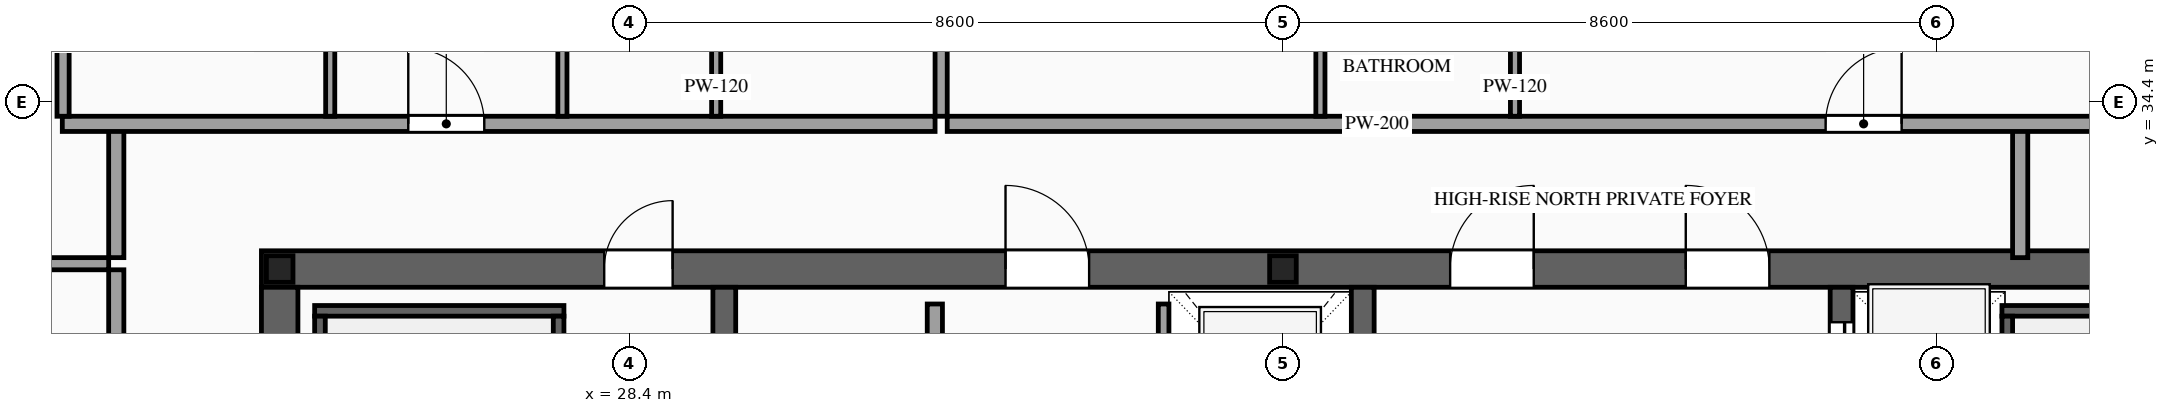
"""IFC4 building model, lengths in metres.
Left out: names, types, materials, properties, quantities, classifications, styles, units other than length and angle.
Written with IfcOpenShell. Run it as: python <this file> out.ifc"""

import sys

from ifc_helpers import new_model, si_unit, direction, frame, frame_2d, origin, origin_2d, place, context, subcontext, project, spatial, rectangle, i_section, extrude, source, transform, mapped, element, fill, save


model = new_model("IFC4")
c1 = context("Model", 3, precision=1e-05, world=origin(), true_north=direction((0.0, 1.0)))
c2 = subcontext(c1, "Body", "Model", "MODEL_VIEW")
j1 = project(units=[si_unit("LENGTHUNIT", "METRE"), si_unit("PLANEANGLEUNIT", "RADIAN")], contexts=[c1])
p1 = place(None, origin())
s1 = spatial("IfcSite", under=j1, at=p1, CompositionType="ELEMENT")
p2 = place(p1, origin())
s2 = spatial("IfcBuilding", under=s1, at=p2, CompositionType="ELEMENT")
p3 = place(p2, frame((0.0, 0.0, 343.2)))
s3 = spatial("IfcBuildingStorey", under=s2, at=p3, CompositionType="ELEMENT", Elevation=343.2)
p4 = place(p3, frame((23.56, 32.2, 0.0), z_axis=(0.0, 0.0, 1.0), x_axis=(1.0, 0.0, 0.0)))
e1 = element("IfcWall", 1, at=p4, inside=s3, PredefinedType="SHEAR", context=c2, shape_type="SweptSolid", body=[
    extrude(rectangle(XDim=26.88, YDim=0.48, at=frame_2d((13.44, 0.0))), origin(), (0.0, 0.0, 1.0), 4.0),
])
p5 = place(p4, frame((4.51, 0.0, 0.0)))
e2 = element("IfcOpeningElement", 2, at=p5, cuts=e1, PredefinedType="OPENING", context=c2, shape_type="SweptSolid", body=[
    extrude(rectangle(XDim=0.9, YDim=2.15, at=frame_2d((0.45, 1.075))), frame((0.0, 0.255, 0.0), z_axis=(0.0, -1.0, 0.0), x_axis=(1.0, 0.0, 0.0)), (0.0, 0.0, 1.0), 0.51),
])
p6 = place(p4, frame((9.79, 0.0, 0.0)))
e3 = element("IfcOpeningElement", 3, at=p6, cuts=e1, PredefinedType="OPENING", context=c2, shape_type="SweptSolid", body=[
    extrude(rectangle(XDim=1.1, YDim=2.2, at=frame_2d((0.55, 1.1))), frame((0.0, 0.255, 0.0), z_axis=(0.0, -1.0, 0.0), x_axis=(1.0, 0.0, 0.0)), (0.0, 0.0, 1.0), 0.51),
])
p7 = place(p4, frame((15.64, 0.0, 0.0)))
e4 = element("IfcOpeningElement", 4, at=p7, cuts=e1, PredefinedType="OPENING", context=c2, shape_type="SweptSolid", body=[
    extrude(rectangle(XDim=1.1, YDim=2.2, at=frame_2d((0.55, 1.1))), frame((0.0, 0.255, 0.0), z_axis=(0.0, -1.0, 0.0), x_axis=(1.0, 0.0, 0.0)), (0.0, 0.0, 1.0), 0.51),
])
p8 = place(p4, frame((18.74, 0.0, 0.0)))
e5 = element("IfcOpeningElement", 5, at=p8, cuts=e1, PredefinedType="OPENING", context=c2, shape_type="SweptSolid", body=[
    extrude(rectangle(XDim=1.1, YDim=2.2, at=frame_2d((0.55, 1.1))), frame((0.0, 0.255, 0.0), z_axis=(0.0, -1.0, 0.0), x_axis=(1.0, 0.0, 0.0)), (0.0, 0.0, 1.0), 0.51),
])
m1 = source(origin(), c2, "Body", "SweptSolid", [
    extrude(rectangle(XDim=12.32, YDim=0.48, at=frame_2d((6.16, 0.0))), origin(), (0.0, 0.0, 1.0), 4.0),
])
p9 = place(p3, frame((23.8, 19.64, 0.0), z_axis=(0.0, 0.0, 1.0), x_axis=(0.0, 1.0, 0.0)))
e6 = element("IfcWall", 6, at=p9, inside=s3, PredefinedType="SHEAR", context=c2, shape_type="MappedRepresentation", body=[
    mapped(m1, transform((0.0, 0.0, 0.0), scale=1.0)),
])
m2 = source(origin(), c2, "Body", "SweptSolid", [
    extrude(rectangle(XDim=12.32, YDim=0.3, at=frame_2d((6.16, 0.0))), origin(), (0.0, 0.0, 1.0), 4.0),
])
for number, where, z_axis, x_axis in (
    (7, (29.65, 19.64, 0.0), (0.0, 0.0, 1.0), (0.0, 1.0, 0.0)),
    (8, (38.05, 19.64, 0.0), (0.0, 0.0, 1.0), (0.0, 1.0, 0.0)),
):
    element("IfcWall", number, at=place(p3, frame(where, z_axis=z_axis, x_axis=x_axis)), inside=s3, PredefinedType="SOLIDWALL", context=c2, shape_type="MappedRepresentation", body=[
        mapped(m2, transform((0.0, 0.0, 0.0), scale=1.0)),
    ])
p10 = place(p3, frame((44.35, 19.64, 0.0), z_axis=(0.0, 0.0, 1.0), x_axis=(0.0, 1.0, 0.0)))
e9 = element("IfcWall", 9, at=p10, inside=s3, PredefinedType="SOLIDWALL", context=c2, shape_type="SweptSolid", body=[
    extrude(rectangle(XDim=12.32, YDim=0.3, at=frame_2d((6.16, 0.0))), origin(), (0.0, 0.0, 1.0), 4.0),
])
p11 = place(p10, frame((6.56, 0.0, 0.0)))
e10 = element("IfcOpeningElement", 10, at=p11, cuts=e9, PredefinedType="OPENING", context=c2, shape_type="SweptSolid", body=[
    extrude(rectangle(XDim=1.1, YDim=2.2, at=frame_2d((0.55, 1.1))), frame((0.0, 0.165, 0.0), z_axis=(0.0, -1.0, 0.0), x_axis=(1.0, 0.0, 0.0)), (0.0, 0.0, 1.0), 0.33),
])
p12 = place(p10, frame((8.66, 0.0, 0.0)))
e11 = element("IfcOpeningElement", 11, at=p12, cuts=e9, PredefinedType="OPENING", context=c2, shape_type="SweptSolid", body=[
    extrude(rectangle(XDim=1.1, YDim=2.2, at=frame_2d((0.55, 1.1))), frame((0.0, 0.165, 0.0), z_axis=(0.0, -1.0, 0.0), x_axis=(1.0, 0.0, 0.0)), (0.0, 0.0, 1.0), 0.33),
])
p13 = place(p10, frame((10.76, 0.0, 0.0)))
e12 = element("IfcOpeningElement", 12, at=p13, cuts=e9, PredefinedType="OPENING", context=c2, shape_type="SweptSolid", body=[
    extrude(rectangle(XDim=1.1, YDim=2.2, at=frame_2d((0.55, 1.1))), frame((0.0, 0.165, 0.0), z_axis=(0.0, -1.0, 0.0), x_axis=(1.0, 0.0, 0.0)), (0.0, 0.0, 1.0), 0.33),
])
m3 = source(origin(), c2, "Body", "SweptSolid", [
    extrude(i_section(OverallWidth=0.35, OverallDepth=0.35, WebThickness=0.012, FlangeThickness=0.019, at=origin_2d()), origin(), (0.0, 0.0, 1.0), 4.0),
])
for number, where, z_axis, x_axis in (
    (13, (23.8, 32.2, 0.0), (0.0, 0.0, 1.0), (1.0, 0.0, 0.0)),
    (14, (37.0, 32.2, 0.0), (0.0, 0.0, 1.0), (1.0, 0.0, 0.0)),
):
    element("IfcColumn", number, at=place(p3, frame(where, z_axis=z_axis, x_axis=x_axis)), inside=s3, PredefinedType="COLUMN", context=c2, shape_type="MappedRepresentation", body=[
        mapped(m3, transform((0.0, 0.0, 0.0), scale=1.0)),
    ])
p14 = place(p3, frame((35.43, 29.4, 0.0), z_axis=(0.0, 0.0, 1.0), x_axis=(0.0, 1.0, 0.0)))
e15 = element("IfcWall", 15, at=p14, inside=s3, PredefinedType="SOLIDWALL", context=c2, shape_type="SweptSolid", body=[
    extrude(rectangle(XDim=2.34, YDim=0.14, at=frame_2d((1.17, 0.0))), origin(), (0.0, 0.0, 1.0), 3.76),
])
p15 = place(p14, frame((0.62, 0.0, 0.0)))
e16 = element("IfcOpeningElement", 16, at=p15, cuts=e15, PredefinedType="OPENING", context=c2, shape_type="SweptSolid", body=[
    extrude(rectangle(XDim=1.1, YDim=2.2, at=frame_2d((0.55, 1.1))), frame((0.0, 0.085, 0.0), z_axis=(0.0, -1.0, 0.0), x_axis=(1.0, 0.0, 0.0)), (0.0, 0.0, 1.0), 0.17),
])
m4 = source(origin(), c2, "Body", "SweptSolid", [
    extrude(rectangle(XDim=3.28, YDim=0.14, at=frame_2d((1.64, 0.0))), origin(), (0.0, 0.0, 1.0), 3.76),
])
p16 = place(p3, frame((24.26, 31.65, 0.0), z_axis=(0.0, 0.0, 1.0), x_axis=(1.0, 0.0, 0.0)))
e17 = element("IfcWall", 17, at=p16, inside=s3, PredefinedType="SOLIDWALL", context=c2, shape_type="MappedRepresentation", body=[
    mapped(m4, transform((0.0, 0.0, 0.0), scale=1.0)),
])
m5 = source(origin(), c2, "Body", "SweptSolid", [
    extrude(rectangle(XDim=8.94, YDim=0.14, at=frame_2d((4.47, 0.0))), origin(), (0.0, 0.0, 1.0), 3.76),
])
for number, where, z_axis, x_axis in (
    (18, (24.33, 22.64, 0.0), (0.0, 0.0, 1.0), (0.0, 1.0, 0.0)),
    (19, (27.47, 22.64, 0.0), (0.0, 0.0, 1.0), (0.0, 1.0, 0.0)),
):
    element("IfcWall", number, at=place(p3, frame(where, z_axis=z_axis, x_axis=x_axis)), inside=s3, PredefinedType="SOLIDWALL", context=c2, shape_type="MappedRepresentation", body=[
        mapped(m5, transform((0.0, 0.0, 0.0), scale=1.0)),
    ])
p17 = place(p3, frame((46.46, 31.65, 0.0), z_axis=(0.0, 0.0, 1.0), x_axis=(1.0, 0.0, 0.0)))
e20 = element("IfcWall", 20, at=p17, inside=s3, PredefinedType="SOLIDWALL", context=c2, shape_type="MappedRepresentation", body=[
    mapped(m4, transform((0.0, 0.0, 0.0), scale=1.0)),
])
p18 = place(p3, frame((46.53, 22.64, 0.0), z_axis=(0.0, 0.0, 1.0), x_axis=(0.0, 1.0, 0.0)))
e21 = element("IfcWall", 21, at=p18, inside=s3, PredefinedType="SOLIDWALL", context=c2, shape_type="MappedRepresentation", body=[
    mapped(m5, transform((0.0, 0.0, 0.0), scale=1.0)),
])
p19 = place(p3, frame((32.42, 28.05, 0.0), z_axis=(0.0, 0.0, 1.0), x_axis=(0.0, 1.0, 0.0)))
e22 = element("IfcWall", 22, at=p19, inside=s3, PredefinedType="PARTITIONING", context=c2, shape_type="SweptSolid", body=[
    extrude(rectangle(XDim=3.69, YDim=0.2, at=frame_2d((1.845, 0.0))), origin(), (0.0, 0.0, 1.0), 3.76),
])
p20 = place(p19, frame((1.395, 0.0, 0.0)))
e23 = element("IfcOpeningElement", 23, at=p20, cuts=e22, PredefinedType="OPENING", context=c2, shape_type="SweptSolid", body=[
    extrude(rectangle(XDim=0.9, YDim=2.15, at=frame_2d((0.45, 1.075))), frame((0.0, 0.115, 0.0), z_axis=(0.0, -1.0, 0.0), x_axis=(1.0, 0.0, 0.0)), (0.0, 0.0, 1.0), 0.23),
])
m6 = source(origin(), c2, "Body", "SweptSolid", [
    extrude(rectangle(XDim=1.7, YDim=0.2, at=frame_2d((0.85, 0.0))), origin(), (0.0, 0.0, 1.0), 3.76),
])
for number, where, z_axis, x_axis in (
    (24, (21.65, 32.35, 0.0), (0.0, 0.0, 1.0), (0.0, 1.0, 0.0)),
    (25, (46.7, 32.35, 0.0), (0.0, 0.0, 1.0), (0.0, 1.0, 0.0)),
):
    element("IfcWall", number, at=place(p3, frame(where, z_axis=z_axis, x_axis=x_axis)), inside=s3, PredefinedType="PARTITIONING", context=c2, shape_type="MappedRepresentation", body=[
        mapped(m6, transform((0.0, 0.0, 0.0), scale=1.0)),
    ])
p21 = place(p3, frame((20.94, 34.11, 0.0), z_axis=(0.0, 0.0, 1.0), x_axis=(1.0, 0.0, 0.0)))
e26 = element("IfcWall", 26, at=p21, inside=s3, PredefinedType="PARTITIONING", context=c2, shape_type="SweptSolid", body=[
    extrude(rectangle(XDim=11.483, YDim=0.2, at=frame_2d((5.742, 0.0))), origin(), (0.0, 0.0, 1.0), 3.76),
])
p22 = place(p21, frame((4.552, 0.0, 0.0)))
e27 = element("IfcOpeningElement", 27, at=p22, cuts=e26, PredefinedType="OPENING", context=c2, shape_type="SweptSolid", body=[
    extrude(rectangle(XDim=1.0, YDim=2.2, at=frame_2d((0.5, 1.1))), frame((0.0, 0.115, 0.0), z_axis=(0.0, -1.0, 0.0), x_axis=(1.0, 0.0, 0.0)), (0.0, 0.0, 1.0), 0.23),
])
m7 = source(origin(), c2, "Body", "SweptSolid", [
    extrude(rectangle(XDim=10.54, YDim=0.16, at=frame_2d((5.27, 0.0))), origin(), (0.0, 0.0, 1.0), 3.76),
])
p23 = place(p3, frame((32.503, 34.21, 0.0), z_axis=(0.0, 0.0, 1.0), x_axis=(0.0, 1.0, 0.0)))
e28 = element("IfcWall", 28, at=p23, inside=s3, PredefinedType="PARTITIONING", context=c2, shape_type="MappedRepresentation", body=[
    mapped(m7, transform((0.0, 0.0, 0.0), scale=1.0)),
])
m8 = source(origin(), c2, "Body", "SweptSolid", [
    extrude(rectangle(XDim=2.9, YDim=0.12, at=frame_2d((1.45, 0.0))), origin(), (0.0, 0.0, 1.0), 3.76),
])
p24 = place(p3, frame((24.465, 34.21, 0.0), z_axis=(0.0, 0.0, 1.0), x_axis=(0.0, 1.0, 0.0)))
e29 = element("IfcWall", 29, at=p24, inside=s3, PredefinedType="PARTITIONING", context=c2, shape_type="MappedRepresentation", body=[
    mapped(m8, transform((0.0, 0.0, 0.0), scale=1.0)),
])
p25 = place(p3, frame((29.543, 34.21, 0.0), z_axis=(0.0, 0.0, 1.0), x_axis=(0.0, 1.0, 0.0)))
e30 = element("IfcWall", 30, at=p25, inside=s3, PredefinedType="PARTITIONING", context=c2, shape_type="SweptSolid", body=[
    extrude(rectangle(XDim=2.9, YDim=0.12, at=frame_2d((1.45, 0.0))), origin(), (0.0, 0.0, 1.0), 3.76),
])
p26 = place(p25, frame((1.025, 0.0, 0.0)))
e31 = element("IfcOpeningElement", 31, at=p26, cuts=e30, PredefinedType="OPENING", context=c2, shape_type="SweptSolid", body=[
    extrude(rectangle(XDim=0.85, YDim=2.1, at=frame_2d((0.425, 1.05))), frame((0.0, 0.075, 0.0), z_axis=(0.0, -1.0, 0.0), x_axis=(1.0, 0.0, 0.0)), (0.0, 0.0, 1.0), 0.15),
])
p27 = place(p3, frame((27.52, 34.21, 0.0), z_axis=(0.0, 0.0, 1.0), x_axis=(0.0, 1.0, 0.0)))
e32 = element("IfcWall", 32, at=p27, inside=s3, PredefinedType="PARTITIONING", context=c2, shape_type="SweptSolid", body=[
    extrude(rectangle(XDim=2.9, YDim=0.12, at=frame_2d((1.45, 0.0))), origin(), (0.0, 0.0, 1.0), 3.76),
])
p28 = place(p27, frame((1.025, 0.0, 0.0)))
e33 = element("IfcOpeningElement", 33, at=p28, cuts=e32, PredefinedType="OPENING", context=c2, shape_type="SweptSolid", body=[
    extrude(rectangle(XDim=0.85, YDim=2.1, at=frame_2d((0.425, 1.05))), frame((0.0, 0.075, 0.0), z_axis=(0.0, -1.0, 0.0), x_axis=(1.0, 0.0, 0.0)), (0.0, 0.0, 1.0), 0.15),
])
p29 = place(p3, frame((32.583, 34.11, 0.0), z_axis=(0.0, 0.0, 1.0), x_axis=(1.0, 0.0, 0.0)))
e34 = element("IfcWall", 34, at=p29, inside=s3, PredefinedType="PARTITIONING", context=c2, shape_type="SweptSolid", body=[
    extrude(rectangle(XDim=20.477, YDim=0.2, at=frame_2d((10.239, 0.0))), origin(), (0.0, 0.0, 1.0), 3.76),
])
p30 = place(p29, frame((11.557, 0.0, 0.0)))
e35 = element("IfcOpeningElement", 35, at=p30, cuts=e34, PredefinedType="OPENING", context=c2, shape_type="SweptSolid", body=[
    extrude(rectangle(XDim=1.0, YDim=2.2, at=frame_2d((0.5, 1.1))), frame((0.0, 0.115, 0.0), z_axis=(0.0, -1.0, 0.0), x_axis=(1.0, 0.0, 0.0)), (0.0, 0.0, 1.0), 0.23),
])
m9 = source(origin(), c2, "Body", "SweptSolid", [
    extrude(rectangle(XDim=10.39, YDim=0.16, at=frame_2d((5.195, 0.0))), origin(), (0.0, 0.0, 1.0), 3.76),
])
p31 = place(p3, frame((20.95, 34.21, 0.0), z_axis=(0.0, 0.0, 1.0), x_axis=(0.0, 1.0, 0.0)))
e36 = element("IfcWall", 36, at=p31, inside=s3, PredefinedType="PARTITIONING", context=c2, shape_type="MappedRepresentation", body=[
    mapped(m9, transform((0.0, 0.0, 0.0), scale=1.0)),
])
p32 = place(p3, frame((37.493, 34.21, 0.0), z_axis=(0.0, 0.0, 1.0), x_axis=(0.0, 1.0, 0.0)))
e37 = element("IfcWall", 37, at=p32, inside=s3, PredefinedType="PARTITIONING", context=c2, shape_type="MappedRepresentation", body=[
    mapped(m8, transform((0.0, 0.0, 0.0), scale=1.0)),
])
p33 = place(p3, frame((40.053, 34.21, 0.0), z_axis=(0.0, 0.0, 1.0), x_axis=(0.0, 1.0, 0.0)))
e38 = element("IfcWall", 38, at=p33, inside=s3, PredefinedType="PARTITIONING", context=c2, shape_type="SweptSolid", body=[
    extrude(rectangle(XDim=2.9, YDim=0.12, at=frame_2d((1.45, 0.0))), origin(), (0.0, 0.0, 1.0), 3.76),
])
p34 = place(p33, frame((1.025, 0.0, 0.0)))
e39 = element("IfcOpeningElement", 39, at=p34, cuts=e38, PredefinedType="OPENING", context=c2, shape_type="SweptSolid", body=[
    extrude(rectangle(XDim=0.85, YDim=2.1, at=frame_2d((0.425, 1.05))), frame((0.0, 0.075, 0.0), z_axis=(0.0, -1.0, 0.0), x_axis=(1.0, 0.0, 0.0)), (0.0, 0.0, 1.0), 0.15),
])
p35 = place(p3, frame((21.65, 19.41, 0.0), z_axis=(0.0, 0.0, 1.0), x_axis=(0.0, 1.0, 0.0)))
e40 = element("IfcWall", 40, at=p35, inside=s3, PredefinedType="PARTITIONING", context=c2, shape_type="SweptSolid", body=[
    extrude(rectangle(XDim=12.78, YDim=0.2, at=frame_2d((6.39, 0.0))), origin(), (0.0, 0.0, 1.0), 3.76),
])
p36 = place(p35, frame((5.89, 0.0, 0.0)))
e41 = element("IfcOpeningElement", 41, at=p36, cuts=e40, PredefinedType="OPENING", context=c2, shape_type="SweptSolid", body=[
    extrude(rectangle(XDim=1.0, YDim=2.2, at=frame_2d((0.5, 1.1))), frame((0.0, 0.115, 0.0), z_axis=(0.0, -1.0, 0.0), x_axis=(1.0, 0.0, 0.0)), (0.0, 0.0, 1.0), 0.23),
])
m10 = source(origin(), c2, "Body", "SweptSolid", [
    extrude(rectangle(XDim=3.5, YDim=0.16, at=frame_2d((1.75, 0.0))), origin(), (0.0, 0.0, 1.0), 3.305),
])
p37 = place(p3, frame((18.05, 32.27, 0.0), z_axis=(0.0, 0.0, 1.0), x_axis=(1.0, 0.0, 0.0)))
e42 = element("IfcWall", 42, at=p37, inside=s3, PredefinedType="PARTITIONING", context=c2, shape_type="MappedRepresentation", body=[
    mapped(m10, transform((0.0, 0.0, 0.0), scale=1.0)),
])
m11 = source(origin(), c2, "Body", "SweptSolid", [
    extrude(rectangle(XDim=1.1, YDim=2.2, at=frame_2d((0.55, 1.1))), frame((0.0, 0.025, 0.0), z_axis=(0.0, -1.0, 0.0), x_axis=(1.0, 0.0, 0.0)), (0.0, 0.0, 1.0), 0.05),
])
p38 = place(p13, origin())
e43 = element("IfcDoor", 43, at=p38, inside=s3, OperationType="SLIDING_TO_LEFT", PredefinedType="DOOR", context=c2, shape_type="MappedRepresentation", body=[
    mapped(m11, transform((0.0, 0.0, 0.0), scale=1.0)),
])
fill(e12, e43)
m12 = source(origin(), c2, "Body", "SweptSolid", [
    extrude(rectangle(XDim=0.9, YDim=2.15, at=frame_2d((0.45, 1.075))), frame((0.0, 0.025, 0.0), z_axis=(0.0, -1.0, 0.0), x_axis=(1.0, 0.0, 0.0)), (0.0, 0.0, 1.0), 0.05),
])
p39 = place(p5, origin())
e44 = element("IfcDoor", 44, at=p39, inside=s3, OperationType="SINGLE_SWING_RIGHT", PredefinedType="DOOR", context=c2, shape_type="MappedRepresentation", body=[
    mapped(m12, transform((0.0, 0.0, 0.0), scale=1.0)),
])
fill(e2, e44)
m13 = source(origin(), c2, "Body", "SweptSolid", [
    extrude(rectangle(XDim=1.1, YDim=2.2, at=frame_2d((0.55, 1.1))), frame((0.0, 0.025, 0.0), z_axis=(0.0, -1.0, 0.0), x_axis=(1.0, 0.0, 0.0)), (0.0, 0.0, 1.0), 0.05),
])
p40 = place(p6, origin())
e45 = element("IfcDoor", 45, at=p40, inside=s3, OperationType="SINGLE_SWING_LEFT", PredefinedType="DOOR", context=c2, shape_type="MappedRepresentation", body=[
    mapped(m13, transform((0.0, 0.0, 0.0), scale=1.0)),
])
fill(e3, e45)
p41 = place(p7, origin())
e46 = element("IfcDoor", 46, at=p41, inside=s3, OperationType="SINGLE_SWING_RIGHT", PredefinedType="DOOR", context=c2, shape_type="MappedRepresentation", body=[
    mapped(m13, transform((0.0, 0.0, 0.0), scale=1.0)),
])
fill(e4, e46)
p42 = place(p8, origin())
e47 = element("IfcDoor", 47, at=p42, inside=s3, OperationType="SINGLE_SWING_LEFT", PredefinedType="DOOR", context=c2, shape_type="MappedRepresentation", body=[
    mapped(m13, transform((0.0, 0.0, 0.0), scale=1.0)),
])
fill(e5, e47)
m14 = source(origin(), c2, "Body", "SweptSolid", [
    extrude(rectangle(XDim=1.0, YDim=2.2, at=frame_2d((0.5, 1.1))), frame((0.0, 0.025, 0.0), z_axis=(0.0, -1.0, 0.0), x_axis=(1.0, 0.0, 0.0)), (0.0, 0.0, 1.0), 0.05),
])
p43 = place(p22, origin())
e48 = element("IfcDoor", 48, at=p43, inside=s3, OperationType="SINGLE_SWING_LEFT", PredefinedType="DOOR", context=c2, shape_type="MappedRepresentation", body=[
    mapped(m14, transform((0.0, 0.0, 0.0), scale=1.0)),
])
fill(e27, e48)
p44 = place(p30, origin())
e49 = element("IfcDoor", 49, at=p44, inside=s3, OperationType="SINGLE_SWING_RIGHT", PredefinedType="DOOR", context=c2, shape_type="MappedRepresentation", body=[
    mapped(m14, transform((0.0, 0.0, 0.0), scale=1.0)),
])
fill(e35, e49)
save(model, sys.argv[1])
